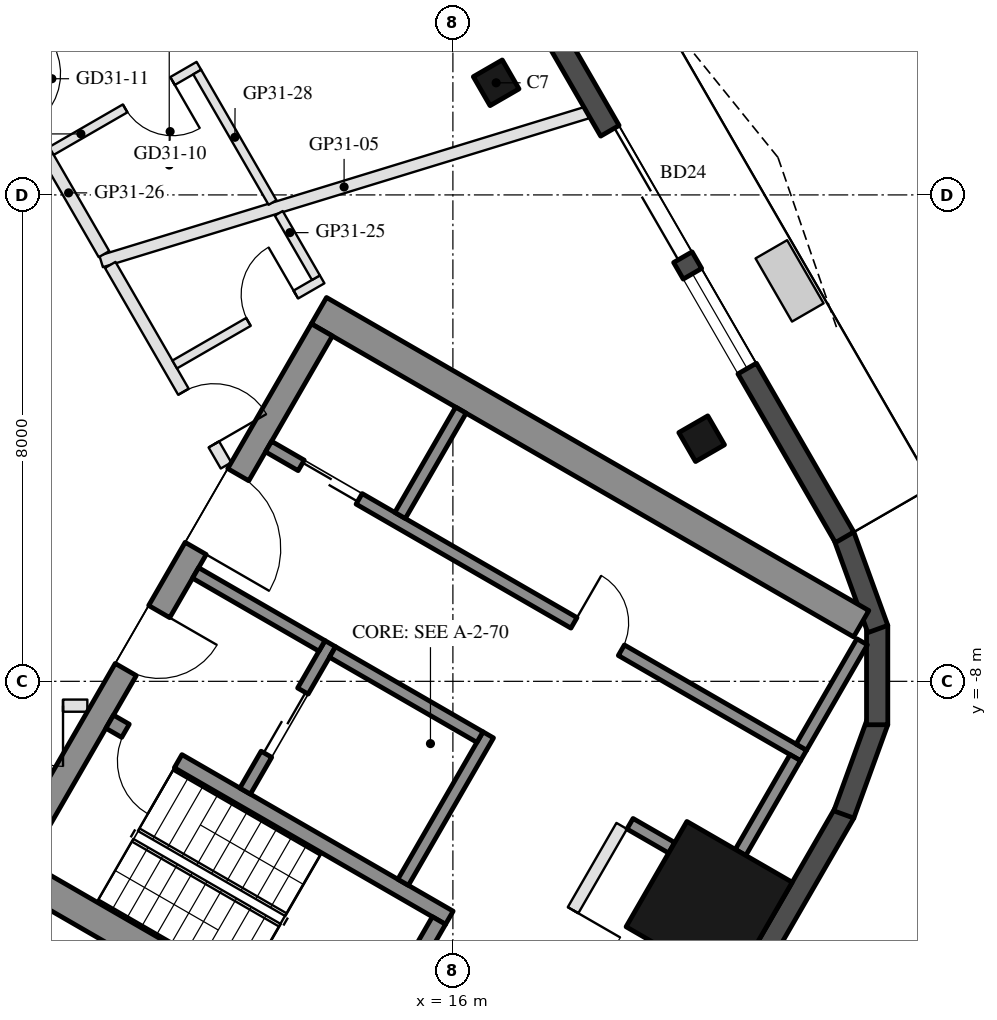
"""IFC4 building model, lengths in metres.
Left out: names, types, materials, properties, quantities, classifications, styles, units other than length and angle.
Written with IfcOpenShell. Run it as: python <this file> out.ifc"""

import sys

from ifc_helpers import new_model, si_unit, direction, frame, frame_2d, origin, origin_2d, place, context, subcontext, project, spatial, rectangle, hollow_rectangle, extrude, boolean, halfspace, element, fill, save


model = new_model("IFC4")
c1 = context("Model", 3, precision=1e-05, world=origin(), true_north=direction((0.0, 1.0)))
c2 = subcontext(c1, "Body", "Model", "MODEL_VIEW")
j1 = project(units=[si_unit("LENGTHUNIT", "METRE"), si_unit("PLANEANGLEUNIT", "RADIAN")], contexts=[c1])
p1 = place(None, origin())
s1 = spatial("IfcSite", under=j1, at=p1, CompositionType="ELEMENT")
p2 = place(p1, origin())
s2 = spatial("IfcBuilding", under=s1, at=p2, CompositionType="ELEMENT")
p3 = place(p2, frame((0.0, 0.0, 302.2)))
s3 = spatial("IfcBuildingStorey", under=s2, at=p3, CompositionType="ELEMENT", Elevation=302.2)
p4 = place(p3, frame((20.091, -4.01, 0.0), z_axis=(0.0, 0.0, 1.0), x_axis=(-0.5, 0.866025403784, 0.0)))
e1 = element("IfcColumn", 1, at=p4, inside=s3, PredefinedType="COLUMN", context=c2, shape_type="SweptSolid", body=[
    boolean("DIFFERENCE", extrude(hollow_rectangle(XDim=0.55, YDim=0.55, WallThickness=0.025, at=origin_2d()), origin(), (0.0, 0.0, 1.0), 3.7), halfspace(frame((0.0, 0.0, 0.04), z_axis=(0.0, 0.0, 1.0), x_axis=(1.0, 0.0, 0.0)), True)),
])
p5 = place(p3, frame((16.711, 1.844, 0.0), z_axis=(0.0, 0.0, 1.0), x_axis=(-0.5, 0.866025403784, 0.0)))
e2 = element("IfcColumn", 2, at=p5, inside=s3, PredefinedType="COLUMN", context=c2, shape_type="SweptSolid", body=[
    boolean("DIFFERENCE", extrude(hollow_rectangle(XDim=0.55, YDim=0.55, WallThickness=0.025, at=origin_2d()), origin(), (0.0, 0.0, 1.0), 3.7), halfspace(frame((0.0, 0.0, 0.034), z_axis=(0.0, 0.0, 1.0), x_axis=(1.0, 0.0, 0.0)), True)),
])
p6 = place(p3, frame((20.214, -11.671, 0.0), z_axis=(0.0, 0.0, 1.0), x_axis=(0.5, 0.866025403784, 0.0)))
e3 = element("IfcColumn", 3, at=p6, inside=s3, PredefinedType="COLUMN", context=c2, shape_type="SweptSolid", body=[
    boolean("DIFFERENCE", extrude(hollow_rectangle(XDim=2.0, YDim=2.0, WallThickness=0.05, at=origin_2d()), origin(), (0.0, 0.0, 1.0), 3.7), halfspace(frame((0.0, 0.0, 0.113), z_axis=(0.0, 0.0, 1.0), x_axis=(1.0, 0.0, 0.0)), True)),
])
p7 = place(p3, frame((20.021, -14.354, 0.0), z_axis=(0.0, 0.0, 1.0), x_axis=(0.500012048649, 0.866018447382, 0.0)))
e4 = element("IfcWall", 4, at=p7, inside=s3, PredefinedType="SOLIDWALL", context=c2, shape_type="SweptSolid", body=[
    extrude(rectangle(XDim=4.841, YDim=0.35, at=frame_2d((2.42, 0.0))), origin(), (0.0, 0.0, 1.0), 3.55),
])
for number, where, z_axis, x_axis in (
    (5, (22.429, -10.19, 0.0), (0.0, 0.0, 1.0), (0.342, 0.94, 0.0)),
    (6, (22.977, -8.714, 0.0), (0.0, 0.0, 1.0), (0.0, 1.0, 0.0)),
    (7, (22.988, -7.14, 0.0), (0.0, 0.0, 1.0), (-0.342, 0.94, 0.0)),
):
    element("IfcWall", number, at=place(p3, frame(where, z_axis=z_axis, x_axis=x_axis)), inside=s3, PredefinedType="SOLIDWALL", context=c2, shape_type="SweptSolid", body=[
        extrude(rectangle(XDim=1.634, YDim=0.35, at=frame_2d((0.817, 0.0))), origin(), (0.0, 0.0, 1.0), 3.55),
    ])
p8 = place(p3, frame((22.442, -5.632, 0.0), z_axis=(0.0, 0.0, 1.0), x_axis=(-0.499983205548, 0.866035099848, 0.0)))
e8 = element("IfcWall", 8, at=p8, inside=s3, PredefinedType="SOLIDWALL", context=c2, shape_type="SweptSolid", body=[
    extrude(rectangle(XDim=10.239, YDim=0.35, at=frame_2d((5.12, 0.0))), origin(), (0.0, 0.0, 1.0), 3.55),
])
p9 = place(p8, frame((5.32, 0.0, 0.0)))
e9 = element("IfcOpeningElement", 9, at=p9, cuts=e8, PredefinedType="OPENING", context=c2, shape_type="SweptSolid", body=[
    extrude(rectangle(XDim=2.4, YDim=2.4, at=frame_2d((1.2, 1.2))), frame((0.0, 0.185, 0.0), z_axis=(0.0, -1.0, 0.0), x_axis=(1.0, 0.0, 0.0)), (0.0, 0.0, 1.0), 0.37),
])
p10 = place(p8, frame((3.205, 0.0, 0.3)))
e10 = element("IfcOpeningElement", 10, at=p10, cuts=e8, PredefinedType="OPENING", context=c2, shape_type="SweptSolid", body=[
    extrude(rectangle(XDim=1.8, YDim=2.65, at=frame_2d((0.9, 1.325))), frame((0.0, 0.185, 0.0), z_axis=(0.0, -1.0, 0.0), x_axis=(1.0, 0.0, 0.0)), (0.0, 0.0, 1.0), 0.37),
])
for number, where, z_axis, x_axis in (
    (11, (8.547, -10.997, 0.0), (0.0, 0.0, 1.0), (0.866, -0.5, 0.0)),
    (12, (13.797, -1.903, 0.0), (0.0, 0.0, 1.0), (0.866, -0.5, 0.0)),
):
    element("IfcWall", number, at=place(p3, frame(where, z_axis=z_axis, x_axis=x_axis)), inside=s3, PredefinedType="SHEAR", context=c2, shape_type="SweptSolid", body=[
        extrude(rectangle(XDim=10.298, YDim=0.5, at=frame_2d((5.149, 0.0))), origin(), (0.0, 0.0, 1.0), 3.5),
    ])
p11 = place(p3, frame((8.845, -10.88, 0.0), z_axis=(0.0, 0.0, 1.0), x_axis=(0.500004234368, 0.866022959057, 0.0)))
e13 = element("IfcWall", 13, at=p11, inside=s3, PredefinedType="SHEAR", context=c2, shape_type="SweptSolid", body=[
    extrude(rectangle(XDim=10.0, YDim=0.4, at=frame_2d((5.0, 0.0))), origin(), (0.0, 0.0, 1.0), 3.5),
])
p12 = place(p11, frame((3.55, 0.0, 0.0)))
e14 = element("IfcOpeningElement", 14, at=p12, cuts=e13, PredefinedType="OPENING", context=c2, shape_type="SweptSolid", body=[
    extrude(rectangle(XDim=1.1, YDim=2.1, at=frame_2d((0.55, 1.05))), frame((0.0, 0.21, 0.0), z_axis=(0.0, -1.0, 0.0), x_axis=(1.0, 0.0, 0.0)), (0.0, 0.0, 1.0), 0.42),
])
p13 = place(p11, frame((5.85, 0.0, 0.0)))
e15 = element("IfcOpeningElement", 15, at=p13, cuts=e13, PredefinedType="OPENING", context=c2, shape_type="SweptSolid", body=[
    extrude(rectangle(XDim=1.4, YDim=2.1, at=frame_2d((0.7, 1.05))), frame((0.0, 0.21, 0.0), z_axis=(0.0, -1.0, 0.0), x_axis=(1.0, 0.0, 0.0)), (0.0, 0.0, 1.0), 0.42),
])
p14 = place(p3, frame((10.356, -8.664, 0.0), z_axis=(0.0, 0.0, 1.0), x_axis=(0.866028629588, -0.499994412703, 0.0)))
e16 = element("IfcWall", 16, at=p14, inside=s3, PredefinedType="SHEAR", context=c2, shape_type="SweptSolid", body=[
    extrude(rectangle(XDim=6.45, YDim=0.25, at=frame_2d((3.225, 0.0))), origin(), (0.0, 0.0, 1.0), 3.5),
])
p15 = place(p14, frame((0.3, 0.0, 0.0)))
e17 = element("IfcOpeningElement", 17, at=p15, cuts=e16, PredefinedType="OPENING", context=c2, shape_type="SweptSolid", body=[
    extrude(rectangle(XDim=1.0, YDim=2.1, at=frame_2d((0.5, 1.05))), frame((0.0, 0.135, 0.0), z_axis=(0.0, -1.0, 0.0), x_axis=(1.0, 0.0, 0.0)), (0.0, 0.0, 1.0), 0.27),
])
p16 = place(p3, frame((14.496, -14.143, 0.0), z_axis=(0.0, 0.0, 1.0), x_axis=(0.500062241894, 0.865989465428, 0.0)))
e18 = element("IfcWall", 18, at=p16, inside=s3, PredefinedType="SHEAR", context=c2, shape_type="SweptSolid", body=[
    extrude(rectangle(XDim=2.55, YDim=0.25, at=frame_2d((1.275, 0.0))), origin(), (0.0, 0.0, 1.0), 3.5),
])
p17 = place(p3, frame((15.181, -11.305, 0.0), z_axis=(0.0, 0.0, 1.0), x_axis=(0.49994636267, 0.866056369097, 0.0)))
e19 = element("IfcWall", 19, at=p17, inside=s3, PredefinedType="SHEAR", context=c2, shape_type="SweptSolid", body=[
    extrude(rectangle(XDim=2.8, YDim=0.2, at=frame_2d((1.4, 0.0))), origin(), (0.0, 0.0, 1.0), 3.5),
])
p18 = place(p3, frame((12.583, -9.805, 0.0), z_axis=(0.0, 0.0, 1.0), x_axis=(0.49994636267, 0.866056369097, 0.0)))
e20 = element("IfcWall", 20, at=p18, inside=s3, PredefinedType="SHEAR", context=c2, shape_type="SweptSolid", body=[
    extrude(rectangle(XDim=2.8, YDim=0.2, at=frame_2d((1.4, 0.0))), origin(), (0.0, 0.0, 1.0), 3.5),
])
p19 = place(p18, frame((0.7, 0.0, 0.0)))
e21 = element("IfcOpeningElement", 21, at=p19, cuts=e20, PredefinedType="OPENING", context=c2, shape_type="SweptSolid", body=[
    extrude(rectangle(XDim=1.2, YDim=2.1, at=frame_2d((0.6, 1.05))), frame((0.0, 0.11, 0.0), z_axis=(0.0, -1.0, 0.0), x_axis=(1.0, 0.0, 0.0)), (0.0, 0.0, 1.0), 0.22),
])
p20 = place(p3, frame((11.768, -6.217, 0.0), z_axis=(0.0, 0.0, 1.0), x_axis=(0.866050077142, -0.499957262057, 0.0)))
e22 = element("IfcWall", 22, at=p20, inside=s3, PredefinedType="SHEAR", context=c2, shape_type="SweptSolid", body=[
    extrude(rectangle(XDim=2.4, YDim=0.2, at=frame_2d((1.2, 0.0))), origin(), (0.0, 0.0, 1.0), 3.5),
])
p21 = place(p3, frame((14.02, -7.517, 0.0), z_axis=(0.0, 0.0, 1.0), x_axis=(0.866034573852, -0.49998411664, 0.0)))
e23 = element("IfcWall", 23, at=p21, inside=s3, PredefinedType="SHEAR", context=c2, shape_type="SweptSolid", body=[
    extrude(rectangle(XDim=2.8, YDim=0.2, at=frame_2d((1.4, 0.0))), origin(), (0.0, 0.0, 1.0), 3.5),
])
p22 = place(p3, frame((12.968, -4.138, 0.0), z_axis=(0.0, 0.0, 1.0), x_axis=(0.866028328073, -0.49999493495, 0.0)))
e24 = element("IfcWall", 24, at=p22, inside=s3, PredefinedType="SHEAR", context=c2, shape_type="SweptSolid", body=[
    extrude(rectangle(XDim=10.16, YDim=0.2, at=frame_2d((5.08, 0.0))), origin(), (0.0, 0.0, 1.0), 3.5),
])
p23 = place(p22, frame((0.62, 0.0, 0.0)))
e25 = element("IfcOpeningElement", 25, at=p23, cuts=e24, PredefinedType="OPENING", context=c2, shape_type="SweptSolid", body=[
    extrude(rectangle(XDim=1.1, YDim=2.1, at=frame_2d((0.55, 1.05))), frame((0.0, 0.11, 0.0), z_axis=(0.0, -1.0, 0.0), x_axis=(1.0, 0.0, 0.0)), (0.0, 0.0, 1.0), 0.22),
])
p24 = place(p22, frame((5.8, 0.0, 0.0)))
e26 = element("IfcOpeningElement", 26, at=p24, cuts=e24, PredefinedType="OPENING", context=c2, shape_type="SweptSolid", body=[
    extrude(rectangle(XDim=0.9, YDim=2.1, at=frame_2d((0.45, 1.05))), frame((0.0, 0.11, 0.0), z_axis=(0.0, -1.0, 0.0), x_axis=(1.0, 0.0, 0.0)), (0.0, 0.0, 1.0), 0.22),
])
p25 = place(p3, frame((20.73, -10.814, 0.0), z_axis=(0.0, 0.0, 1.0), x_axis=(0.499961193289, 0.866047807691, 0.0)))
e27 = element("IfcWall", 27, at=p25, inside=s3, PredefinedType="SHEAR", context=c2, shape_type="SweptSolid", body=[
    extrude(rectangle(XDim=1.8, YDim=0.2, at=frame_2d((0.9, 0.0))), origin(), (0.0, 0.0, 1.0), 3.5),
])
p26 = place(p3, frame((18.913, -10.342, 0.0), z_axis=(0.0, 0.0, 1.0), x_axis=(0.86597493103, -0.500087411186, 0.0)))
e28 = element("IfcWall", 28, at=p26, inside=s3, PredefinedType="SHEAR", context=c2, shape_type="SweptSolid", body=[
    extrude(rectangle(XDim=0.791, YDim=0.2, at=frame_2d((0.396, 0.0))), origin(), (0.0, 0.0, 1.0), 3.5),
])
for number, where, z_axis, x_axis in (
    (29, (15.131, -5.272, 0.0), (0.0, 0.0, 1.0), (0.5, 0.866, 0.0)),
    (30, (21.73, -9.082, 0.0), (0.0, 0.0, 1.0), (0.5, 0.866, 0.0)),
):
    element("IfcWall", number, at=place(p3, frame(where, z_axis=z_axis, x_axis=x_axis)), inside=s3, PredefinedType="SHEAR", context=c2, shape_type="SweptSolid", body=[
        extrude(rectangle(XDim=2.0, YDim=0.2, at=frame_2d((1.0, 0.0))), origin(), (0.0, 0.0, 1.0), 3.5),
    ])
p27 = place(p3, frame((16.076, -15.055, 0.0), z_axis=(0.0, 0.0, 1.0), x_axis=(0.499995103361, 0.866028230842, 0.0)))
e31 = element("IfcWall", 31, at=p27, inside=s3, PredefinedType="PARTITIONING", context=c2, shape_type="SweptSolid", body=[
    extrude(rectangle(XDim=5.4, YDim=0.2, at=frame_2d((2.7, 0.0))), origin(), (0.0, 0.0, 1.0), 3.5),
])
p28 = place(p27, frame((2.9, 0.0, 0.0)))
e32 = element("IfcOpeningElement", 32, at=p28, cuts=e31, PredefinedType="OPENING", context=c2, shape_type="SweptSolid", body=[
    extrude(rectangle(XDim=0.9, YDim=2.1, at=frame_2d((0.45, 1.05))), frame((0.0, 0.11, 0.0), z_axis=(0.0, -1.0, 0.0), x_axis=(1.0, 0.0, 0.0)), (0.0, 0.0, 1.0), 0.22),
])
p29 = place(p3, frame((18.206, 1.355, 0.0), z_axis=(0.0, 0.0, 1.0), x_axis=(-0.956150885444, -0.292874519658, 0.0)))
e33 = element("IfcWall", 33, at=p29, inside=s3, PredefinedType="PARTITIONING", context=c2, shape_type="SweptSolid", body=[
    extrude(rectangle(XDim=8.358, YDim=0.2, at=frame_2d((4.179, 0.0))), origin(), (0.0, 0.0, 1.0), 3.1),
])
p30 = place(p3, frame((14.595, 5.81, 0.0), z_axis=(0.0, 0.0, 1.0), x_axis=(-0.884286267242, -0.46694517619, 0.0)))
e34 = element("IfcWall", 34, at=p30, inside=s3, PredefinedType="PARTITIONING", context=c2, shape_type="SweptSolid", body=[
    extrude(rectangle(XDim=7.25, YDim=0.2, at=frame_2d((3.625, 0.0))), origin(), (0.0, 0.0, 1.0), 3.16),
])
p31 = place(p3, frame((9.988, -8.4, 0.0), z_axis=(0.0, 0.0, 1.0), x_axis=(-1.0, 0.0, 0.0)))
e35 = element("IfcWall", 35, at=p31, inside=s3, PredefinedType="PARTITIONING", context=c2, shape_type="SweptSolid", body=[
    extrude(rectangle(XDim=3.809, YDim=0.2, at=frame_2d((1.904, 0.0))), origin(), (0.0, 0.0, 1.0), 3.1),
])
p32 = place(p31, frame((0.4, 0.0, 0.0)))
e36 = element("IfcOpeningElement", 36, at=p32, cuts=e35, PredefinedType="OPENING", context=c2, shape_type="SweptSolid", body=[
    extrude(rectangle(XDim=1.0, YDim=2.1, at=frame_2d((0.5, 1.05))), frame((0.0, 0.11, 0.0), z_axis=(0.0, -1.0, 0.0), x_axis=(1.0, 0.0, 0.0)), (0.0, 0.0, 1.0), 0.22),
])
p33 = place(p3, frame((10.365, -1.152, 0.0), z_axis=(0.0, 0.0, 1.0), x_axis=(0.499999897272, -0.866025463095, 0.0)))
e37 = element("IfcWall", 37, at=p33, inside=s3, PredefinedType="PARTITIONING", context=c2, shape_type="SweptSolid", body=[
    extrude(rectangle(XDim=3.809, YDim=0.2, at=frame_2d((1.904, 0.0))), origin(), (0.0, 0.0, 1.0), 3.1),
])
p34 = place(p33, frame((2.409, 0.0, 0.0)))
e38 = element("IfcOpeningElement", 38, at=p34, cuts=e37, PredefinedType="OPENING", context=c2, shape_type="SweptSolid", body=[
    extrude(rectangle(XDim=1.0, YDim=2.1, at=frame_2d((0.5, 1.05))), frame((0.0, 0.11, 0.0), z_axis=(0.0, -1.0, 0.0), x_axis=(1.0, 0.0, 0.0)), (0.0, 0.0, 1.0), 0.22),
])
p35 = place(p3, frame((11.425, -2.789, 0.0), z_axis=(0.0, 0.0, 1.0), x_axis=(0.865996816683, 0.500049511043, 0.0)))
e39 = element("IfcWall", 39, at=p35, inside=s3, PredefinedType="PARTITIONING", context=c2, shape_type="SweptSolid", body=[
    extrude(rectangle(XDim=2.8, YDim=0.15, at=frame_2d((1.4, 0.0))), origin(), (0.0, 0.0, 1.0), 3.55),
])
p36 = place(p35, frame((1.4, 0.0, 0.0)))
e40 = element("IfcOpeningElement", 40, at=p36, cuts=e39, PredefinedType="OPENING", context=c2, shape_type="SweptSolid", body=[
    extrude(rectangle(XDim=0.9, YDim=2.1, at=frame_2d((0.45, 1.05))), frame((0.0, 0.085, 0.0), z_axis=(0.0, -1.0, 0.0), x_axis=(1.0, 0.0, 0.0)), (0.0, 0.0, 1.0), 0.17),
])
p37 = place(p3, frame((13.747, -1.361, 0.0), z_axis=(0.0, 0.0, 1.0), x_axis=(-0.499941460885, 0.86605919872, 0.0)))
e41 = element("IfcWall", 41, at=p37, inside=s3, PredefinedType="PARTITIONING", context=c2, shape_type="SweptSolid", body=[
    extrude(rectangle(XDim=1.222, YDim=0.15, at=frame_2d((0.611, 0.0))), origin(), (0.0, 0.0, 1.0), 3.1),
])
p38 = place(p3, frame((8.323, 2.385, 0.0), z_axis=(0.0, 0.0, 1.0), x_axis=(0.499998569178, -0.866026229868, 0.0)))
e42 = element("IfcWall", 42, at=p38, inside=s3, PredefinedType="PARTITIONING", context=c2, shape_type="SweptSolid", body=[
    extrude(rectangle(XDim=3.878, YDim=0.2, at=frame_2d((1.939, 0.0))), origin(), (0.0, 0.0, 1.0), 3.1),
])
p39 = place(p38, frame((0.451, 0.0, 0.0)))
e43 = element("IfcOpeningElement", 43, at=p39, cuts=e42, PredefinedType="OPENING", context=c2, shape_type="SweptSolid", body=[
    extrude(rectangle(XDim=1.0, YDim=2.1, at=frame_2d((0.5, 1.05))), frame((0.0, 0.11, 0.0), z_axis=(0.0, -1.0, 0.0), x_axis=(1.0, 0.0, 0.0)), (0.0, 0.0, 1.0), 0.22),
])
p40 = place(p3, frame((11.822, 2.123, 0.0), z_axis=(0.0, 0.0, 1.0), x_axis=(-0.865996816683, -0.500049511043, 0.0)))
e44 = element("IfcWall", 44, at=p40, inside=s3, PredefinedType="PARTITIONING", context=c2, shape_type="SweptSolid", body=[
    extrude(rectangle(XDim=2.8, YDim=0.15, at=frame_2d((1.4, 0.0))), origin(), (0.0, 0.0, 1.0), 3.55),
])
p41 = place(p40, frame((0.5, 0.0, 0.0)))
e45 = element("IfcOpeningElement", 45, at=p41, cuts=e44, PredefinedType="OPENING", context=c2, shape_type="SweptSolid", body=[
    extrude(rectangle(XDim=0.9, YDim=2.1, at=frame_2d((0.45, 1.05))), frame((0.0, 0.085, 0.0), z_axis=(0.0, -1.0, 0.0), x_axis=(1.0, 0.0, 0.0)), (0.0, 0.0, 1.0), 0.17),
])
p42 = place(p3, frame((13.034, -0.125, 0.0), z_axis=(0.0, 0.0, 1.0), x_axis=(-0.499975499923, 0.866039548448, 0.0)))
e46 = element("IfcWall", 46, at=p42, inside=s3, PredefinedType="PARTITIONING", context=c2, shape_type="SweptSolid", body=[
    extrude(rectangle(XDim=2.478, YDim=0.15, at=frame_2d((1.239, 0.0))), origin(), (0.0, 0.0, 1.0), 3.55),
])
p43 = place(p9, frame((2.4, 0.0, 0.0), z_axis=(0.0, 0.0, 1.0), x_axis=(-1.0, 0.0, 0.0)))
e47 = element("IfcDoor", 47, at=p43, inside=s3, OperationType="SLIDING_TO_LEFT", PredefinedType="DOOR", context=c2, shape_type="SweptSolid", body=[
    extrude(rectangle(XDim=2.4, YDim=2.4, at=frame_2d((1.2, 1.2))), frame((0.0, 0.025, 0.0), z_axis=(0.0, -1.0, 0.0), x_axis=(1.0, 0.0, 0.0)), (0.0, 0.0, 1.0), 0.05),
])
fill(e9, e47)
p44 = place(p10, origin())
e48 = element("IfcWindow", 48, at=p44, inside=s3, PartitioningType="SINGLE_PANEL", PredefinedType="WINDOW", context=c2, shape_type="SweptSolid", body=[
    extrude(rectangle(XDim=1.8, YDim=2.65, at=frame_2d((0.9, 1.325))), frame((0.0, 0.03, 0.0), z_axis=(0.0, -1.0, 0.0), x_axis=(1.0, 0.0, 0.0)), (0.0, 0.0, 1.0), 0.06),
])
fill(e10, e48)
p45 = place(p19, origin())
e49 = element("IfcDoor", 49, at=p45, inside=s3, OperationType="DOUBLE_DOOR_SLIDING", PredefinedType="DOOR", context=c2, shape_type="SweptSolid", body=[
    extrude(rectangle(XDim=1.2, YDim=2.1, at=frame_2d((0.6, 1.05))), frame((0.0, 0.025, 0.0), z_axis=(0.0, -1.0, 0.0), x_axis=(1.0, 0.0, 0.0)), (0.0, 0.0, 1.0), 0.05),
])
fill(e21, e49)
p46 = place(p23, origin())
e50 = element("IfcDoor", 50, at=p46, inside=s3, OperationType="DOUBLE_DOOR_SLIDING", PredefinedType="DOOR", context=c2, shape_type="SweptSolid", body=[
    extrude(rectangle(XDim=1.1, YDim=2.1, at=frame_2d((0.55, 1.05))), frame((0.0, 0.025, 0.0), z_axis=(0.0, -1.0, 0.0), x_axis=(1.0, 0.0, 0.0)), (0.0, 0.0, 1.0), 0.05),
])
fill(e25, e50)
p47 = place(p24, origin())
e51 = element("IfcDoor", 51, at=p47, inside=s3, OperationType="SINGLE_SWING_LEFT", PredefinedType="DOOR", context=c2, shape_type="SweptSolid", body=[
    extrude(rectangle(XDim=0.9, YDim=2.1, at=frame_2d((0.45, 1.05))), frame((0.0, 0.025, 0.0), z_axis=(0.0, -1.0, 0.0), x_axis=(1.0, 0.0, 0.0)), (0.0, 0.0, 1.0), 0.05),
])
fill(e26, e51)
p48 = place(p28, frame((0.9, 0.0, 0.0), z_axis=(0.0, 0.0, 1.0), x_axis=(-1.0, 0.0, 0.0)))
e52 = element("IfcDoor", 52, at=p48, inside=s3, OperationType="SINGLE_SWING_LEFT", PredefinedType="DOOR", context=c2, shape_type="SweptSolid", body=[
    extrude(rectangle(XDim=0.9, YDim=2.1, at=frame_2d((0.45, 1.05))), frame((0.0, 0.025, 0.0), z_axis=(0.0, -1.0, 0.0), x_axis=(1.0, 0.0, 0.0)), (0.0, 0.0, 1.0), 0.05),
])
fill(e32, e52)
p49 = place(p12, frame((1.1, 0.0, 0.0), z_axis=(0.0, 0.0, 1.0), x_axis=(-1.0, 0.0, 0.0)))
e53 = element("IfcDoor", 53, at=p49, inside=s3, OperationType="SINGLE_SWING_LEFT", PredefinedType="DOOR", context=c2, shape_type="SweptSolid", body=[
    extrude(rectangle(XDim=1.1, YDim=2.1, at=frame_2d((0.55, 1.05))), frame((0.0, 0.025, 0.0), z_axis=(0.0, -1.0, 0.0), x_axis=(1.0, 0.0, 0.0)), (0.0, 0.0, 1.0), 0.05),
])
fill(e14, e53)
p50 = place(p13, frame((1.4, 0.0, 0.0), z_axis=(0.0, 0.0, 1.0), x_axis=(-1.0, 0.0, 0.0)))
e54 = element("IfcDoor", 54, at=p50, inside=s3, OperationType="DOUBLE_DOOR_SINGLE_SWING", PredefinedType="DOOR", context=c2, shape_type="SweptSolid", body=[
    extrude(rectangle(XDim=1.4, YDim=2.1, at=frame_2d((0.7, 1.05))), frame((0.0, 0.025, 0.0), z_axis=(0.0, -1.0, 0.0), x_axis=(1.0, 0.0, 0.0)), (0.0, 0.0, 1.0), 0.05),
])
fill(e15, e54)
p51 = place(p15, frame((1.0, 0.0, 0.0), z_axis=(0.0, 0.0, 1.0), x_axis=(-1.0, 0.0, 0.0)))
e55 = element("IfcDoor", 55, at=p51, inside=s3, OperationType="SINGLE_SWING_LEFT", PredefinedType="DOOR", context=c2, shape_type="SweptSolid", body=[
    extrude(rectangle(XDim=1.0, YDim=2.1, at=frame_2d((0.5, 1.05))), frame((0.0, 0.025, 0.0), z_axis=(0.0, -1.0, 0.0), x_axis=(1.0, 0.0, 0.0)), (0.0, 0.0, 1.0), 0.05),
])
fill(e17, e55)
p52 = place(p32, origin())
e56 = element("IfcDoor", 56, at=p52, inside=s3, OperationType="SINGLE_SWING_LEFT", PredefinedType="DOOR", context=c2, shape_type="SweptSolid", body=[
    extrude(rectangle(XDim=1.0, YDim=2.1, at=frame_2d((0.5, 1.05))), frame((0.0, 0.025, 0.0), z_axis=(0.0, -1.0, 0.0), x_axis=(1.0, 0.0, 0.0)), (0.0, 0.0, 1.0), 0.05),
])
fill(e36, e56)
p53 = place(p36, origin())
e57 = element("IfcDoor", 57, at=p53, inside=s3, OperationType="SINGLE_SWING_RIGHT", PredefinedType="DOOR", context=c2, shape_type="SweptSolid", body=[
    extrude(rectangle(XDim=0.9, YDim=2.1, at=frame_2d((0.45, 1.05))), frame((0.0, 0.025, 0.0), z_axis=(0.0, -1.0, 0.0), x_axis=(1.0, 0.0, 0.0)), (0.0, 0.0, 1.0), 0.05),
])
fill(e40, e57)
p54 = place(p34, origin())
e58 = element("IfcDoor", 58, at=p54, inside=s3, OperationType="SINGLE_SWING_RIGHT", PredefinedType="DOOR", context=c2, shape_type="SweptSolid", body=[
    extrude(rectangle(XDim=1.0, YDim=2.1, at=frame_2d((0.5, 1.05))), frame((0.0, 0.025, 0.0), z_axis=(0.0, -1.0, 0.0), x_axis=(1.0, 0.0, 0.0)), (0.0, 0.0, 1.0), 0.05),
])
fill(e38, e58)
p55 = place(p41, origin())
e59 = element("IfcDoor", 59, at=p55, inside=s3, OperationType="SINGLE_SWING_LEFT", PredefinedType="DOOR", context=c2, shape_type="SweptSolid", body=[
    extrude(rectangle(XDim=0.9, YDim=2.1, at=frame_2d((0.45, 1.05))), frame((0.0, 0.025, 0.0), z_axis=(0.0, -1.0, 0.0), x_axis=(1.0, 0.0, 0.0)), (0.0, 0.0, 1.0), 0.05),
])
fill(e45, e59)
save(model, sys.argv[1])
